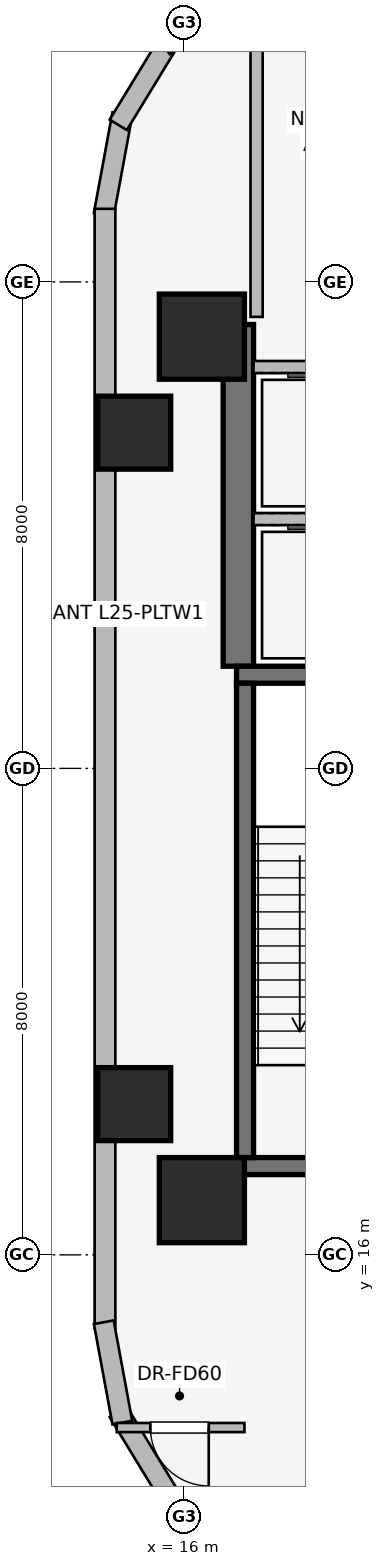
"""IFC4 building model, lengths in metres.
Left out: names, types, materials, properties, quantities, classifications, styles, units other than length and angle.
Written with IfcOpenShell. Run it as: python <this file> out.ifc"""

import sys

from ifc_helpers import new_model, si_unit, direction, frame, frame_2d, origin, origin_2d, place, context, subcontext, project, spatial, rectangle, extrude, element, fill, save


model = new_model("IFC4")
c1 = context("Model", 3, precision=1e-05, world=origin(), true_north=direction((0.0, 1.0)))
c2 = subcontext(c1, "Body", "Model", "MODEL_VIEW")
j1 = project(units=[si_unit("LENGTHUNIT", "METRE"), si_unit("PLANEANGLEUNIT", "RADIAN")], contexts=[c1])
p1 = place(None, origin())
s1 = spatial("IfcSite", under=j1, at=p1, CompositionType="ELEMENT")
p2 = place(p1, origin())
s2 = spatial("IfcBuilding", under=s1, at=p2, CompositionType="ELEMENT")
p3 = place(p2, frame((0.0, 0.0, 96.35)))
s3 = spatial("IfcBuildingStorey", under=s2, at=p3, CompositionType="ELEMENT", Elevation=96.35)
p4 = place(p3, frame((16.9, 25.68, 0.0), z_axis=(0.0, 0.0, 1.0), x_axis=(0.0, 1.0, 0.0)))
e1 = element("IfcWall", 1, at=p4, inside=s3, PredefinedType="SHEAR", context=c2, shape_type="SweptSolid", body=[
    extrude(rectangle(XDim=5.62, YDim=0.5, at=frame_2d((2.81, 0.0))), origin(), (0.0, 0.0, 1.0), 5.2),
])
for number, where, z_axis, x_axis in (
    (2, (16.87, 17.46, 0.0), (0.0, 0.0, 1.0), (1.0, 0.0, 0.0)),
    (3, (20.63, 25.54, 0.0), (0.0, 0.0, 1.0), (-1.0, 0.0, 0.0)),
):
    element("IfcWall", number, at=place(p3, frame(where, z_axis=z_axis, x_axis=x_axis)), inside=s3, PredefinedType="SHEAR", context=c2, shape_type="SweptSolid", body=[
        extrude(rectangle(XDim=3.76, YDim=0.28, at=frame_2d((1.88, 0.0))), origin(), (0.0, 0.0, 1.0), 5.2),
    ])
p5 = place(p3, frame((17.01, 25.4, 0.0), z_axis=(0.0, 0.0, 1.0), x_axis=(0.0, -1.0, 0.0)))
e4 = element("IfcWall", 4, at=p5, inside=s3, PredefinedType="SHEAR", context=c2, shape_type="SweptSolid", body=[
    extrude(rectangle(XDim=7.8, YDim=0.28, at=frame_2d((3.9, 0.0))), origin(), (0.0, 0.0, 1.0), 5.2),
])
for number, where, z_axis, x_axis in (
    (5, (16.3, 16.9, 0.0), (0.0, 0.0, 1.0), (1.0, 0.0, 0.0)),
    (6, (16.3, 31.1, 0.0), (0.0, 0.0, 1.0), (1.0, 0.0, 0.0)),
):
    element("IfcColumn", number, at=place(p3, frame(where, z_axis=z_axis, x_axis=x_axis)), inside=s3, PredefinedType="COLUMN", context=c2, shape_type="SweptSolid", body=[
        extrude(rectangle(XDim=1.4, YDim=1.4, at=origin_2d()), origin(), (0.0, 0.0, 1.0), 5.2),
    ])
for number, where, z_axis, x_axis in (
    (7, (15.187, 29.521, 0.0), (0.0, 0.0, 1.0), (1.0, 0.0, 0.0)),
    (8, (15.187, 18.479, 0.0), (0.0, 0.0, 1.0), (1.0, 0.0, 0.0)),
):
    element("IfcColumn", number, at=place(p3, frame(where, z_axis=z_axis, x_axis=x_axis)), inside=s3, PredefinedType="COLUMN", context=c2, shape_type="SweptSolid", body=[
        extrude(rectangle(XDim=1.2, YDim=1.2, at=origin_2d()), origin(), (0.0, 0.0, 1.0), 5.2),
    ])
p6 = place(p3, frame((14.687, 33.108, 0.0), z_axis=(0.0, 0.0, 1.0), x_axis=(0.181714143354, 0.983351397063, 0.0)))
e9 = element("IfcWall", 9, at=p6, inside=s3, PredefinedType="STANDARD", context=c2, shape_type="SweptSolid", body=[
    extrude(rectangle(XDim=1.678, YDim=0.33, at=frame_2d((0.839, 0.0))), origin(), (0.0, 0.0, 1.0), 4.78),
])
p7 = place(p3, frame((14.925, 34.583, 0.0), z_axis=(0.0, 0.0, 1.0), x_axis=(0.520584129191, 0.853810379671, 0.0)))
e10 = element("IfcWall", 10, at=p7, inside=s3, PredefinedType="STANDARD", context=c2, shape_type="SweptSolid", body=[
    extrude(rectangle(XDim=1.677, YDim=0.33, at=frame_2d((0.838, 0.0))), origin(), (0.0, 0.0, 1.0), 4.78),
])
p8 = place(p3, frame((15.673, 35.875, 0.0), z_axis=(0.0, 0.0, 1.0), x_axis=(0.790691856293, 0.61221433207, 0.0)))
e11 = element("IfcWall", 11, at=p8, inside=s3, PredefinedType="STANDARD", context=c2, shape_type="SweptSolid", body=[
    extrude(rectangle(XDim=1.676, YDim=0.33, at=frame_2d((0.838, 0.0))), origin(), (0.0, 0.0, 1.0), 4.78),
])
p9 = place(p3, frame((14.707, 14.798, 0.0), z_axis=(0.0, 0.0, 1.0), x_axis=(0.0, 1.0, 0.0)))
e12 = element("IfcWall", 12, at=p9, inside=s3, PredefinedType="STANDARD", context=c2, shape_type="SweptSolid", body=[
    extrude(rectangle(XDim=18.404, YDim=0.34, at=frame_2d((9.202, 0.0))), origin(), (0.0, 0.0, 1.0), 3.688),
])
p10 = place(p3, frame((16.998, 11.099, 0.0), z_axis=(0.0, 0.0, 1.0), x_axis=(-0.790691856293, 0.61221433207, 0.0)))
e13 = element("IfcWall", 13, at=p10, inside=s3, PredefinedType="STANDARD", context=c2, shape_type="SweptSolid", body=[
    extrude(rectangle(XDim=1.676, YDim=0.33, at=frame_2d((0.838, 0.0))), origin(), (0.0, 0.0, 1.0), 4.78),
])
p11 = place(p3, frame((15.798, 11.985, 0.0), z_axis=(0.0, 0.0, 1.0), x_axis=(-0.520584129191, 0.853810379671, 0.0)))
e14 = element("IfcWall", 14, at=p11, inside=s3, PredefinedType="STANDARD", context=c2, shape_type="SweptSolid", body=[
    extrude(rectangle(XDim=1.677, YDim=0.33, at=frame_2d((0.838, 0.0))), origin(), (0.0, 0.0, 1.0), 4.78),
])
p12 = place(p3, frame((14.992, 13.242, 0.0), z_axis=(0.0, 0.0, 1.0), x_axis=(-0.181714143354, 0.983351397063, 0.0)))
e15 = element("IfcWall", 15, at=p12, inside=s3, PredefinedType="STANDARD", context=c2, shape_type="SweptSolid", body=[
    extrude(rectangle(XDim=1.678, YDim=0.33, at=frame_2d((0.839, 0.0))), origin(), (0.0, 0.0, 1.0), 4.78),
])
p13 = place(p3, frame((17.15, 28.1, 0.0), z_axis=(0.0, 0.0, 1.0), x_axis=(1.0, 0.0, 0.0)))
e16 = element("IfcWall", 16, at=p13, inside=s3, PredefinedType="PARTITIONING", context=c2, shape_type="SweptSolid", body=[
    extrude(rectangle(XDim=2.5, YDim=0.2, at=frame_2d((1.25, 0.0))), origin(), (0.0, 0.0, 1.0), 4.78),
])
p14 = place(p3, frame((19.65, 30.6, 0.0), z_axis=(0.0, 0.0, 1.0), x_axis=(-1.0, 0.0, 0.0)))
e17 = element("IfcWall", 17, at=p14, inside=s3, PredefinedType="PARTITIONING", context=c2, shape_type="SweptSolid", body=[
    extrude(rectangle(XDim=2.5, YDim=0.2, at=frame_2d((1.25, 0.0))), origin(), (0.0, 0.0, 1.0), 3.68),
])
p15 = place(p3, frame((17.2, 36.65, 0.0), z_axis=(0.0, 0.0, 1.0), x_axis=(0.0, -1.0, 0.0)))
e18 = element("IfcWall", 18, at=p15, inside=s3, PredefinedType="PARTITIONING", context=c2, shape_type="SweptSolid", body=[
    extrude(rectangle(XDim=5.225, YDim=0.2, at=frame_2d((2.612, 0.0))), origin(), (0.0, 0.0, 1.0), 4.78),
])
p16 = place(p3, frame((17.0, 13.16, 0.0), z_axis=(0.0, 0.0, 1.0), x_axis=(-1.0, 0.0, 0.0)))
e19 = element("IfcWall", 19, at=p16, inside=s3, PredefinedType="PARTITIONING", context=c2, shape_type="SweptSolid", body=[
    extrude(rectangle(XDim=2.1, YDim=0.15, at=frame_2d((1.05, 0.0))), origin(), (0.0, 0.0, 1.0), 4.78),
])
p17 = place(p16, frame((0.587, 0.0, 0.0)))
e20 = element("IfcOpeningElement", 20, at=p17, cuts=e19, PredefinedType="OPENING", context=c2, shape_type="SweptSolid", body=[
    extrude(rectangle(XDim=0.96, YDim=2.0, at=frame_2d((0.48, 1.0))), frame((0.0, 0.085, 0.0), z_axis=(0.0, -1.0, 0.0), x_axis=(1.0, 0.0, 0.0)), (0.0, 0.0, 1.0), 0.17),
])
p18 = place(p17, origin())
e21 = element("IfcDoor", 21, at=p18, inside=s3, OperationType="SINGLE_SWING_LEFT", PredefinedType="DOOR", context=c2, shape_type="SweptSolid", body=[
    extrude(rectangle(XDim=0.96, YDim=2.0, at=frame_2d((0.48, 1.0))), frame((0.0, 0.025, 0.0), z_axis=(0.0, -1.0, 0.0), x_axis=(1.0, 0.0, 0.0)), (0.0, 0.0, 1.0), 0.05),
])
fill(e20, e21)
save(model, sys.argv[1])
